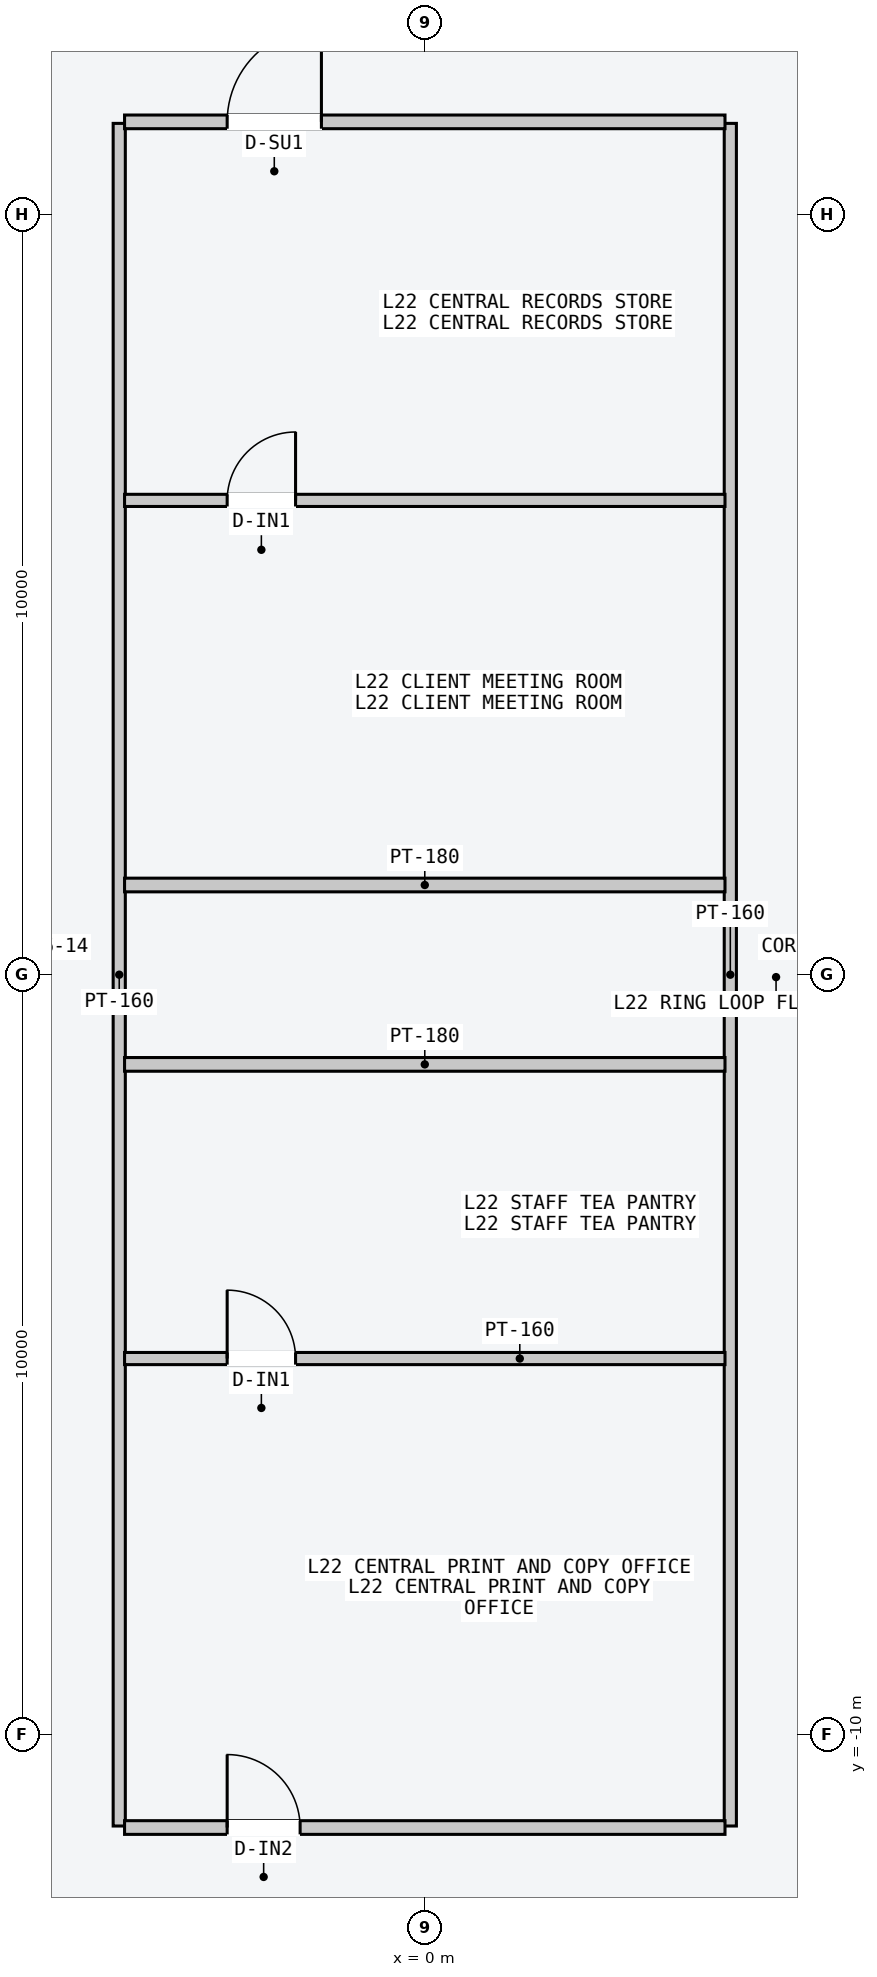
"""IFC4 building model, lengths in metres.
Left out: names, types, materials, properties, quantities, classifications, styles, units other than length and angle.
Written with IfcOpenShell. Run it as: python <this file> out.ifc"""

import sys

from ifc_helpers import new_model, si_unit, direction, frame, frame_2d, origin, place, context, subcontext, project, spatial, rectangle, extrude, element, fill, save


model = new_model("IFC4")
c1 = context("Model", 3, precision=1e-05, world=origin(), true_north=direction((0.0, 1.0)))
c2 = subcontext(c1, "Body", "Model", "MODEL_VIEW")
j1 = project(units=[si_unit("LENGTHUNIT", "METRE"), si_unit("PLANEANGLEUNIT", "RADIAN")], contexts=[c1])
p1 = place(None, origin())
s1 = spatial("IfcSite", under=j1, at=p1, CompositionType="ELEMENT")
p2 = place(p1, origin())
s2 = spatial("IfcBuilding", under=s1, at=p2, CompositionType="ELEMENT")
p3 = place(p2, frame((0.0, 0.0, 87.3)))
s3 = spatial("IfcBuildingStorey", under=s2, at=p3, CompositionType="ELEMENT", Elevation=87.3)
for number, where, z_axis, x_axis in (
    (1, (-4.02, -11.2, 0.0), (0.0, 0.0, 1.0), (0.0, 1.0, 0.0)),
    (2, (4.02, -11.2, 0.0), (0.0, 0.0, 1.0), (0.0, 1.0, 0.0)),
):
    element("IfcWall", number, at=place(p3, frame(where, z_axis=z_axis, x_axis=x_axis)), inside=s3, PredefinedType="PARTITIONING", context=c2, shape_type="SweptSolid", body=[
        extrude(rectangle(XDim=22.4, YDim=0.16, at=frame_2d((11.2, 0.0))), origin(), (0.0, 0.0, 1.0), 4.3),
    ])
p4 = place(p3, frame((-3.95, 1.18, 0.0), z_axis=(0.0, 0.0, 1.0), x_axis=(1.0, 0.0, 0.0)))
e3 = element("IfcWall", 3, at=p4, inside=s3, PredefinedType="PARTITIONING", context=c2, shape_type="SweptSolid", body=[
    extrude(rectangle(XDim=7.9, YDim=0.18, at=frame_2d((3.95, 0.0))), origin(), (0.0, 0.0, 1.0), 4.3),
])
p5 = place(p3, frame((-3.95, 11.22, 0.0), z_axis=(0.0, 0.0, 1.0), x_axis=(1.0, 0.0, 0.0)))
e4 = element("IfcWall", 4, at=p5, inside=s3, PredefinedType="PARTITIONING", context=c2, shape_type="SweptSolid", body=[
    extrude(rectangle(XDim=7.9, YDim=0.18, at=frame_2d((3.95, 0.0))), origin(), (0.0, 0.0, 1.0), 4.3),
])
p6 = place(p5, frame((1.35, 0.0, 0.0)))
e5 = element("IfcOpeningElement", 5, at=p6, cuts=e4, PredefinedType="OPENING", context=c2, shape_type="SweptSolid", body=[
    extrude(rectangle(XDim=1.24, YDim=2.24, at=frame_2d((0.62, 1.12))), frame((0.0, 0.1, 0.0), z_axis=(0.0, -1.0, 0.0), x_axis=(1.0, 0.0, 0.0)), (0.0, 0.0, 1.0), 0.2),
])
p7 = place(p3, frame((-3.95, -1.18, 0.0), z_axis=(0.0, 0.0, 1.0), x_axis=(1.0, 0.0, 0.0)))
e6 = element("IfcWall", 6, at=p7, inside=s3, PredefinedType="PARTITIONING", context=c2, shape_type="SweptSolid", body=[
    extrude(rectangle(XDim=7.9, YDim=0.18, at=frame_2d((3.95, 0.0))), origin(), (0.0, 0.0, 1.0), 4.3),
])
p8 = place(p3, frame((-3.95, -11.22, 0.0), z_axis=(0.0, 0.0, 1.0), x_axis=(1.0, 0.0, 0.0)))
e7 = element("IfcWall", 7, at=p8, inside=s3, PredefinedType="PARTITIONING", context=c2, shape_type="SweptSolid", body=[
    extrude(rectangle(XDim=7.9, YDim=0.18, at=frame_2d((3.95, 0.0))), origin(), (0.0, 0.0, 1.0), 4.3),
])
p9 = place(p8, frame((1.35, 0.0, 0.0)))
e8 = element("IfcOpeningElement", 8, at=p9, cuts=e7, PredefinedType="OPENING", context=c2, shape_type="SweptSolid", body=[
    extrude(rectangle(XDim=0.96, YDim=2.18, at=frame_2d((0.48, 1.09))), frame((0.0, 0.1, 0.0), z_axis=(0.0, -1.0, 0.0), x_axis=(1.0, 0.0, 0.0)), (0.0, 0.0, 1.0), 0.2),
])
p10 = place(p3, frame((-3.95, 6.24, 0.0), z_axis=(0.0, 0.0, 1.0), x_axis=(1.0, 0.0, 0.0)))
e9 = element("IfcWall", 9, at=p10, inside=s3, PredefinedType="PARTITIONING", context=c2, shape_type="SweptSolid", body=[
    extrude(rectangle(XDim=7.9, YDim=0.16, at=frame_2d((3.95, 0.0))), origin(), (0.0, 0.0, 1.0), 4.3),
])
p11 = place(p10, frame((1.35, 0.0, 0.0)))
e10 = element("IfcOpeningElement", 10, at=p11, cuts=e9, PredefinedType="OPENING", context=c2, shape_type="SweptSolid", body=[
    extrude(rectangle(XDim=0.9, YDim=2.15, at=frame_2d((0.45, 1.075))), frame((0.0, 0.09, 0.0), z_axis=(0.0, -1.0, 0.0), x_axis=(1.0, 0.0, 0.0)), (0.0, 0.0, 1.0), 0.18),
])
p12 = place(p3, frame((-3.95, -5.05, 0.0), z_axis=(0.0, 0.0, 1.0), x_axis=(1.0, 0.0, 0.0)))
e11 = element("IfcWall", 11, at=p12, inside=s3, PredefinedType="PARTITIONING", context=c2, shape_type="SweptSolid", body=[
    extrude(rectangle(XDim=7.9, YDim=0.16, at=frame_2d((3.95, 0.0))), origin(), (0.0, 0.0, 1.0), 4.3),
])
p13 = place(p12, frame((1.35, 0.0, 0.0)))
e12 = element("IfcOpeningElement", 12, at=p13, cuts=e11, PredefinedType="OPENING", context=c2, shape_type="SweptSolid", body=[
    extrude(rectangle(XDim=0.9, YDim=2.15, at=frame_2d((0.45, 1.075))), frame((0.0, 0.09, 0.0), z_axis=(0.0, -1.0, 0.0), x_axis=(1.0, 0.0, 0.0)), (0.0, 0.0, 1.0), 0.18),
])
p14 = place(p6, origin())
e13 = element("IfcDoor", 13, at=p14, inside=s3, OperationType="SINGLE_SWING_RIGHT", PredefinedType="DOOR", context=c2, shape_type="SweptSolid", body=[
    extrude(rectangle(XDim=1.24, YDim=2.24, at=frame_2d((0.62, 1.12))), frame((0.0, 0.025, 0.0), z_axis=(0.0, -1.0, 0.0), x_axis=(1.0, 0.0, 0.0)), (0.0, 0.0, 1.0), 0.05),
])
fill(e5, e13)
p15 = place(p9, origin())
e14 = element("IfcDoor", 14, at=p15, inside=s3, OperationType="SINGLE_SWING_LEFT", PredefinedType="DOOR", context=c2, shape_type="SweptSolid", body=[
    extrude(rectangle(XDim=0.96, YDim=2.18, at=frame_2d((0.48, 1.09))), frame((0.0, 0.025, 0.0), z_axis=(0.0, -1.0, 0.0), x_axis=(1.0, 0.0, 0.0)), (0.0, 0.0, 1.0), 0.05),
])
fill(e8, e14)
p16 = place(p11, origin())
e15 = element("IfcDoor", 15, at=p16, inside=s3, OperationType="SINGLE_SWING_RIGHT", PredefinedType="DOOR", context=c2, shape_type="SweptSolid", body=[
    extrude(rectangle(XDim=0.9, YDim=2.15, at=frame_2d((0.45, 1.075))), frame((0.0, 0.025, 0.0), z_axis=(0.0, -1.0, 0.0), x_axis=(1.0, 0.0, 0.0)), (0.0, 0.0, 1.0), 0.05),
])
fill(e10, e15)
p17 = place(p13, origin())
e16 = element("IfcDoor", 16, at=p17, inside=s3, OperationType="SINGLE_SWING_LEFT", PredefinedType="DOOR", context=c2, shape_type="SweptSolid", body=[
    extrude(rectangle(XDim=0.9, YDim=2.15, at=frame_2d((0.45, 1.075))), frame((0.0, 0.025, 0.0), z_axis=(0.0, -1.0, 0.0), x_axis=(1.0, 0.0, 0.0)), (0.0, 0.0, 1.0), 0.05),
])
fill(e12, e16)
save(model, sys.argv[1])
